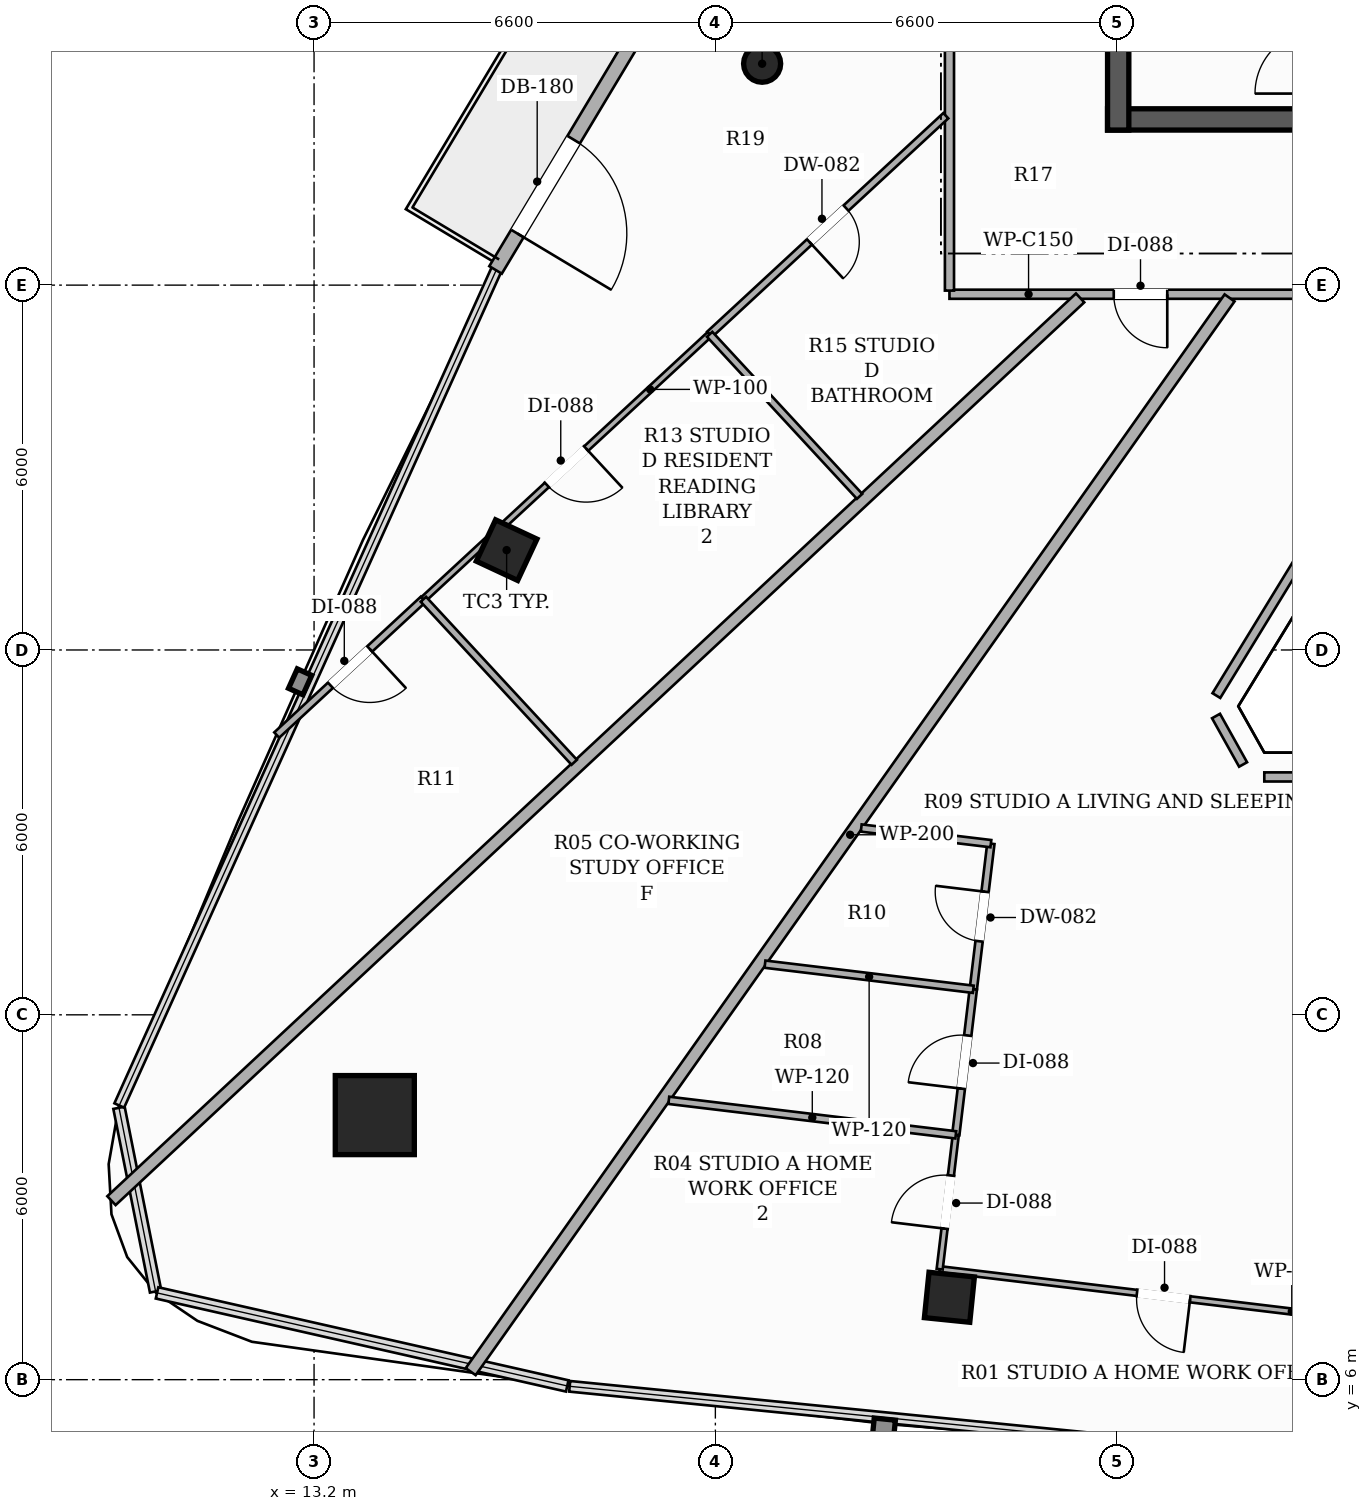
"""IFC4 building model, lengths in metres.
Left out: names, types, materials, properties, quantities, classifications, styles, units other than length and angle.
Written with IfcOpenShell. Run it as: python <this file> out.ifc"""

import sys

from ifc_helpers import new_model, si_unit, direction, frame, frame_2d, origin, origin_2d, place, context, subcontext, project, spatial, rectangle, hollow_rectangle, hollow_circle, extrude, element, fill, save


model = new_model("IFC4")
c1 = context("Model", 3, precision=1e-05, world=origin(), true_north=direction((0.0, 1.0)))
c2 = subcontext(c1, "Body", "Model", "MODEL_VIEW")
j1 = project(units=[si_unit("LENGTHUNIT", "METRE"), si_unit("PLANEANGLEUNIT", "RADIAN")], contexts=[c1])
p1 = place(None, origin())
s1 = spatial("IfcSite", under=j1, at=p1, CompositionType="ELEMENT")
p2 = place(p1, origin())
s2 = spatial("IfcBuilding", under=s1, at=p2, CompositionType="ELEMENT")
p3 = place(p2, frame((0.0, 0.0, 219.5)))
s3 = spatial("IfcBuildingStorey", under=s2, at=p3, CompositionType="ELEMENT", Elevation=219.5)
p4 = place(p3, frame((26.25, 26.725, 0.0), z_axis=(0.0, 0.0, 1.0), x_axis=(1.0, 0.0, 0.0)))
e1 = element("IfcWall", 1, at=p4, inside=s3, PredefinedType="SHEAR", context=c2, shape_type="SweptSolid", body=[
    extrude(rectangle(XDim=13.5, YDim=0.35, at=frame_2d((6.75, 0.0))), origin(), (0.0, 0.0, 1.0), 3.3),
])
p5 = place(p4, frame((4.35, 0.0, 0.0)))
e2 = element("IfcOpeningElement", 2, at=p5, cuts=e1, PredefinedType="OPENING", context=c2, shape_type="SweptSolid", body=[
    extrude(rectangle(XDim=1.05, YDim=2.15, at=frame_2d((0.525, 1.075))), frame((0.0, 0.185, 0.0), z_axis=(0.0, -1.0, 0.0), x_axis=(1.0, 0.0, 0.0)), (0.0, 0.0, 1.0), 0.37),
])
p6 = place(p4, frame((8.3, 0.0, 0.0)))
e3 = element("IfcOpeningElement", 3, at=p6, cuts=e1, PredefinedType="OPENING", context=c2, shape_type="SweptSolid", body=[
    extrude(rectangle(XDim=1.05, YDim=2.15, at=frame_2d((0.525, 1.075))), frame((0.0, 0.185, 0.0), z_axis=(0.0, -1.0, 0.0), x_axis=(1.0, 0.0, 0.0)), (0.0, 0.0, 1.0), 0.37),
])
p7 = place(p3, frame((26.425, 26.55, 0.0), z_axis=(0.0, 0.0, 1.0), x_axis=(0.0, 1.0, 0.0)))
e4 = element("IfcWall", 4, at=p7, inside=s3, PredefinedType="SHEAR", context=c2, shape_type="SweptSolid", body=[
    extrude(rectangle(XDim=7.5, YDim=0.35, at=frame_2d((3.75, 0.0))), origin(), (0.0, 0.0, 1.0), 3.3),
])
p8 = place(p3, frame((14.199, 10.351, 0.0), z_axis=(0.0, 0.0, 1.0), x_axis=(1.0, 0.0, 0.0)))
e5 = element("IfcColumn", 5, at=p8, inside=s3, PredefinedType="COLUMN", context=c2, shape_type="SweptSolid", body=[
    extrude(hollow_rectangle(XDim=1.3, YDim=1.3, WallThickness=0.04, at=origin_2d()), origin(), (0.0, 0.0, 1.0), 3.3),
])
p9 = place(p3, frame((20.569, 27.641, 0.0), z_axis=(0.0, 0.0, 1.0), x_axis=(1.0, 0.0, 0.0)))
e6 = element("IfcColumn", 6, at=p9, inside=s3, PredefinedType="COLUMN", context=c2, shape_type="SweptSolid", body=[
    extrude(hollow_circle(Radius=0.305, WallThickness=0.016, at=origin_2d()), origin(), (0.0, 0.0, 1.0), 3.3),
])
for number, where, z_axis, x_axis in (
    (7, (16.367, 19.642, 0.0), (0.0, 0.0, 1.0), (0.423, 0.906, 0.0)),
    (8, (23.649, 7.355, 0.0), (0.0, 0.0, 1.0), (-0.995, 0.101, 0.0)),
):
    element("IfcColumn", number, at=place(p3, frame(where, z_axis=z_axis, x_axis=x_axis)), inside=s3, PredefinedType="COLUMN", context=c2, shape_type="SweptSolid", body=[
        extrude(hollow_rectangle(XDim=0.75, YDim=0.75, WallThickness=0.025, at=origin_2d()), origin(), (0.0, 0.0, 1.0), 3.3),
    ])
p10 = place(p3, frame((21.458, 33.042, 0.0), z_axis=(0.0, 0.0, 1.0), x_axis=(-0.51433465168, -0.857589567381, 0.0)))
e9 = element("IfcWall", 9, at=p10, inside=s3, PredefinedType="SOLIDWALL", context=c2, shape_type="SweptSolid", body=[
    extrude(rectangle(XDim=10.252, YDim=0.24, at=frame_2d((5.126, 0.0))), origin(), (0.0, 0.0, 1.0), 2.624),
])
p11 = place(p10, frame((7.754, 0.0, 0.0)))
e10 = element("IfcOpeningElement", 10, at=p11, cuts=e9, PredefinedType="OPENING", context=c2, shape_type="SweptSolid", body=[
    extrude(rectangle(XDim=1.8, YDim=2.2, at=frame_2d((0.9, 1.1))), frame((0.0, 0.13, 0.0), z_axis=(0.0, -1.0, 0.0), x_axis=(1.0, 0.0, 0.0)), (0.0, 0.0, 1.0), 0.26),
])
p12 = place(p3, frame((32.073, 23.85, 0.0), z_axis=(0.0, 0.0, 1.0), x_axis=(-1.0, 0.0, 0.0)))
e11 = element("IfcWall", 11, at=p12, inside=s3, PredefinedType="PARTITIONING", context=c2, shape_type="SweptSolid", body=[
    extrude(rectangle(XDim=8.423, YDim=0.15, at=frame_2d((4.211, 0.0))), origin(), (0.0, 0.0, 1.0), 2.565),
])
p13 = place(p12, frame((1.601, 0.0, 0.0)))
e12 = element("IfcOpeningElement", 12, at=p13, cuts=e11, PredefinedType="OPENING", context=c2, shape_type="SweptSolid", body=[
    extrude(rectangle(XDim=0.92, YDim=2.15, at=frame_2d((0.46, 1.075))), frame((0.0, 0.085, 0.0), z_axis=(0.0, -1.0, 0.0), x_axis=(1.0, 0.0, 0.0)), (0.0, 0.0, 1.0), 0.17),
])
p14 = place(p12, frame((4.841, 0.0, 0.0)))
e13 = element("IfcOpeningElement", 13, at=p14, cuts=e11, PredefinedType="OPENING", context=c2, shape_type="SweptSolid", body=[
    extrude(rectangle(XDim=0.88, YDim=2.1, at=frame_2d((0.44, 1.05))), frame((0.0, 0.085, 0.0), z_axis=(0.0, -1.0, 0.0), x_axis=(1.0, 0.0, 0.0)), (0.0, 0.0, 1.0), 0.17),
])
p15 = place(p3, frame((23.65, 23.91, 0.0), z_axis=(0.0, 0.0, 1.0), x_axis=(0.0, 1.0, 0.0)))
e14 = element("IfcWall", 14, at=p15, inside=s3, PredefinedType="PARTITIONING", context=c2, shape_type="SweptSolid", body=[
    extrude(rectangle(XDim=12.163, YDim=0.15, at=frame_2d((6.082, 0.0))), origin(), (0.0, 0.0, 1.0), 2.492),
])
p16 = place(p15, frame((5.622, 0.0, 0.0)))
e15 = element("IfcOpeningElement", 15, at=p16, cuts=e14, PredefinedType="OPENING", context=c2, shape_type="SweptSolid", body=[
    extrude(rectangle(XDim=0.92, YDim=2.15, at=frame_2d((0.46, 1.075))), frame((0.0, 0.085, 0.0), z_axis=(0.0, -1.0, 0.0), x_axis=(1.0, 0.0, 0.0)), (0.0, 0.0, 1.0), 0.17),
])
p17 = place(p3, frame((37.172, 15.912, 0.0), z_axis=(0.0, 0.0, 1.0), x_axis=(-1.0, 0.0, 0.0)))
e16 = element("IfcWall", 16, at=p17, inside=s3, PredefinedType="PARTITIONING", context=c2, shape_type="SweptSolid", body=[
    extrude(rectangle(XDim=8.344, YDim=0.15, at=frame_2d((4.172, 0.0))), origin(), (0.0, 0.0, 1.0), 2.773),
])
p18 = place(p3, frame((28.479, 16.117, 0.0), z_axis=(0.0, 0.0, 1.0), x_axis=(-0.487503666908, 0.873120939361, 0.0)))
e17 = element("IfcWall", 17, at=p18, inside=s3, PredefinedType="PARTITIONING", context=c2, shape_type="SweptSolid", body=[
    extrude(rectangle(XDim=0.913, YDim=0.15, at=frame_2d((0.457, 0.0))), origin(), (0.0, 0.0, 1.0), 3.06),
])
p19 = place(p3, frame((28.04, 17.25, 0.0), z_axis=(0.0, 0.0, 1.0), x_axis=(0.521949656317, 0.852976292912, 0.0)))
e18 = element("IfcWall", 18, at=p19, inside=s3, PredefinedType="PARTITIONING", context=c2, shape_type="SweptSolid", body=[
    extrude(rectangle(XDim=7.667, YDim=0.15, at=frame_2d((3.833, 0.0))), origin(), (0.0, 0.0, 1.0), 2.773),
])
p20 = place(p3, frame((15.776, 6.132, 0.0), z_axis=(0.0, 0.0, 1.0), x_axis=(0.577200381612, 0.816602546816, 0.0)))
e19 = element("IfcWall", 19, at=p20, inside=s3, PredefinedType="PARTITIONING", context=c2, shape_type="SweptSolid", body=[
    extrude(rectangle(XDim=21.624, YDim=0.2, at=frame_2d((10.812, 0.0))), origin(), (0.0, 0.0, 1.0), 2.492),
])
p21 = place(p3, frame((25.799, 23.79, 0.0), z_axis=(0.0, 0.0, 1.0), x_axis=(-0.731584830333, -0.681750420629, 0.0)))
e20 = element("IfcWall", 20, at=p21, inside=s3, PredefinedType="PARTITIONING", context=c2, shape_type="SweptSolid", body=[
    extrude(rectangle(XDim=21.776, YDim=0.2, at=frame_2d((10.888, 0.0))), origin(), (0.0, 0.0, 1.0), 2.492),
])
p22 = place(p3, frame((24.042, 12.42, 0.0), z_axis=(0.0, 0.0, 1.0), x_axis=(0.119823599825, 0.992795197876, 0.0)))
e21 = element("IfcWall", 21, at=p22, inside=s3, PredefinedType="PARTITIONING", context=c2, shape_type="SweptSolid", body=[
    extrude(rectangle(XDim=2.412, YDim=0.12, at=frame_2d((1.206, 0.0))), origin(), (0.0, 0.0, 1.0), 3.06),
])
p23 = place(p22, frame((0.796, 0.0, 0.0)))
e22 = element("IfcOpeningElement", 22, at=p23, cuts=e21, PredefinedType="OPENING", context=c2, shape_type="SweptSolid", body=[
    extrude(rectangle(XDim=0.82, YDim=2.1, at=frame_2d((0.41, 1.05))), frame((0.0, 0.07, 0.0), z_axis=(0.0, -1.0, 0.0), x_axis=(1.0, 0.0, 0.0)), (0.0, 0.0, 1.0), 0.14),
])
p24 = place(p3, frame((24.331, 14.815, 0.0), z_axis=(0.0, 0.0, 1.0), x_axis=(-0.992808897326, 0.119710038805, 0.0)))
e23 = element("IfcWall", 23, at=p24, inside=s3, PredefinedType="PARTITIONING", context=c2, shape_type="SweptSolid", body=[
    extrude(rectangle(XDim=2.147, YDim=0.12, at=frame_2d((1.074, 0.0))), origin(), (0.0, 0.0, 1.0), 3.06),
])
p25 = place(p3, frame((23.754, 10.026, 0.0), z_axis=(0.0, 0.0, 1.0), x_axis=(0.119472593193, 0.992837499028, 0.0)))
e24 = element("IfcWall", 24, at=p25, inside=s3, PredefinedType="PARTITIONING", context=c2, shape_type="SweptSolid", body=[
    extrude(rectangle(XDim=2.411, YDim=0.12, at=frame_2d((1.206, 0.0))), origin(), (0.0, 0.0, 1.0), 3.06),
])
p26 = place(p25, frame((0.766, 0.0, 0.0)))
e25 = element("IfcOpeningElement", 25, at=p26, cuts=e24, PredefinedType="OPENING", context=c2, shape_type="SweptSolid", body=[
    extrude(rectangle(XDim=0.88, YDim=2.1, at=frame_2d((0.44, 1.05))), frame((0.0, 0.07, 0.0), z_axis=(0.0, -1.0, 0.0), x_axis=(1.0, 0.0, 0.0)), (0.0, 0.0, 1.0), 0.14),
])
p27 = place(p3, frame((30.853, 6.931, 0.0), z_axis=(0.0, 0.0, 1.0), x_axis=(-0.992840033501, 0.119451529409, 0.0)))
e26 = element("IfcWall", 26, at=p27, inside=s3, PredefinedType="PARTITIONING", context=c2, shape_type="SweptSolid", body=[
    extrude(rectangle(XDim=7.417, YDim=0.1, at=frame_2d((3.708, 0.0))), origin(), (0.0, 0.0, 1.0), 2.492),
])
p28 = place(p27, frame((3.269, 0.0, 0.0)))
e27 = element("IfcOpeningElement", 27, at=p28, cuts=e26, PredefinedType="OPENING", context=c2, shape_type="SweptSolid", body=[
    extrude(rectangle(XDim=0.88, YDim=2.1, at=frame_2d((0.44, 1.05))), frame((0.0, 0.06, 0.0), z_axis=(0.0, -1.0, 0.0), x_axis=(1.0, 0.0, 0.0)), (0.0, 0.0, 1.0), 0.12),
])
p29 = place(p3, frame((23.489, 7.817, 0.0), z_axis=(0.0, 0.0, 1.0), x_axis=(0.119063005136, 0.992886700892, 0.0)))
e28 = element("IfcWall", 28, at=p29, inside=s3, PredefinedType="PARTITIONING", context=c2, shape_type="SweptSolid", body=[
    extrude(rectangle(XDim=2.225, YDim=0.1, at=frame_2d((1.112, 0.0))), origin(), (0.0, 0.0, 1.0), 2.492),
])
p30 = place(p29, frame((0.672, 0.0, 0.0)))
e29 = element("IfcOpeningElement", 29, at=p30, cuts=e28, PredefinedType="OPENING", context=c2, shape_type="SweptSolid", body=[
    extrude(rectangle(XDim=0.88, YDim=2.1, at=frame_2d((0.44, 1.05))), frame((0.0, 0.06, 0.0), z_axis=(0.0, -1.0, 0.0), x_axis=(1.0, 0.0, 0.0)), (0.0, 0.0, 1.0), 0.12),
])
p31 = place(p3, frame((24.042, 12.42, 0.0), z_axis=(0.0, 0.0, 1.0), x_axis=(-0.992809391247, 0.119705942421, 0.0)))
e30 = element("IfcWall", 30, at=p31, inside=s3, PredefinedType="PARTITIONING", context=c2, shape_type="SweptSolid", body=[
    extrude(rectangle(XDim=3.451, YDim=0.12, at=frame_2d((1.726, 0.0))), origin(), (0.0, 0.0, 1.0), 2.773),
])
p32 = place(p3, frame((23.754, 10.026, 0.0), z_axis=(0.0, 0.0, 1.0), x_axis=(-0.992834006213, 0.1195016155, 0.0)))
e31 = element("IfcWall", 31, at=p32, inside=s3, PredefinedType="PARTITIONING", context=c2, shape_type="SweptSolid", body=[
    extrude(rectangle(XDim=4.754, YDim=0.12, at=frame_2d((2.377, 0.0))), origin(), (0.0, 0.0, 1.0), 2.773),
])
p33 = place(p3, frame((23.59, 26.786, 0.0), z_axis=(0.0, 0.0, 1.0), x_axis=(-0.733888422473, -0.679270037143, 0.0)))
e32 = element("IfcWall", 32, at=p33, inside=s3, PredefinedType="PARTITIONING", context=c2, shape_type="SweptSolid", body=[
    extrude(rectangle(XDim=5.292, YDim=0.12, at=frame_2d((2.646, 0.0))), origin(), (0.0, 0.0, 1.0), 3.06),
])
p34 = place(p33, frame((2.236, 0.0, 0.0)))
e33 = element("IfcOpeningElement", 33, at=p34, cuts=e32, PredefinedType="OPENING", context=c2, shape_type="SweptSolid", body=[
    extrude(rectangle(XDim=0.82, YDim=2.1, at=frame_2d((0.41, 1.05))), frame((0.0, 0.07, 0.0), z_axis=(0.0, -1.0, 0.0), x_axis=(1.0, 0.0, 0.0)), (0.0, 0.0, 1.0), 0.14),
])
p35 = place(p3, frame((14.998, 18.834, 0.0), z_axis=(0.0, 0.0, 1.0), x_axis=(-0.733840210512, -0.679322121998, 0.0)))
e34 = element("IfcWall", 34, at=p35, inside=s3, PredefinedType="PARTITIONING", context=c2, shape_type="SweptSolid", body=[
    extrude(rectangle(XDim=3.287, YDim=0.12, at=frame_2d((1.644, 0.0))), origin(), (0.0, 0.0, 1.0), 3.06),
])
p36 = place(p35, frame((1.203, 0.0, 0.0)))
e35 = element("IfcOpeningElement", 35, at=p36, cuts=e34, PredefinedType="OPENING", context=c2, shape_type="SweptSolid", body=[
    extrude(rectangle(XDim=0.88, YDim=2.1, at=frame_2d((0.44, 1.05))), frame((0.0, 0.07, 0.0), z_axis=(0.0, -1.0, 0.0), x_axis=(1.0, 0.0, 0.0)), (0.0, 0.0, 1.0), 0.14),
])
p37 = place(p3, frame((19.706, 23.191, 0.0), z_axis=(0.0, 0.0, 1.0), x_axis=(-0.733941951163, -0.679212199775, 0.0)))
e36 = element("IfcWall", 36, at=p37, inside=s3, PredefinedType="PARTITIONING", context=c2, shape_type="SweptSolid", body=[
    extrude(rectangle(XDim=6.415, YDim=0.1, at=frame_2d((3.208, 0.0))), origin(), (0.0, 0.0, 1.0), 2.492),
])
p38 = place(p37, frame((2.767, 0.0, 0.0)))
e37 = element("IfcOpeningElement", 37, at=p38, cuts=e36, PredefinedType="OPENING", context=c2, shape_type="SweptSolid", body=[
    extrude(rectangle(XDim=0.88, YDim=2.1, at=frame_2d((0.44, 1.05))), frame((0.0, 0.06, 0.0), z_axis=(0.0, -1.0, 0.0), x_axis=(1.0, 0.0, 0.0)), (0.0, 0.0, 1.0), 0.12),
])
p39 = place(p3, frame((22.172, 20.526, 0.0), z_axis=(0.0, 0.0, 1.0), x_axis=(-0.67917603964, 0.733975413198, 0.0)))
e38 = element("IfcWall", 38, at=p39, inside=s3, PredefinedType="PARTITIONING", context=c2, shape_type="SweptSolid", body=[
    extrude(rectangle(XDim=3.631, YDim=0.12, at=frame_2d((1.815, 0.0))), origin(), (0.0, 0.0, 1.0), 2.565),
])
p40 = place(p3, frame((14.998, 18.834, 0.0), z_axis=(0.0, 0.0, 1.0), x_axis=(0.67920675179, -0.733946992856, 0.0)))
e39 = element("IfcWall", 39, at=p40, inside=s3, PredefinedType="PARTITIONING", context=c2, shape_type="SweptSolid", body=[
    extrude(rectangle(XDim=3.653, YDim=0.12, at=frame_2d((1.826, 0.0))), origin(), (0.0, 0.0, 1.0), 2.492),
])
p41 = place(p11, origin())
e40 = element("IfcDoor", 40, at=p41, inside=s3, OperationType="SINGLE_SWING_RIGHT", PredefinedType="DOOR", context=c2, shape_type="SweptSolid", body=[
    extrude(rectangle(XDim=1.8, YDim=2.2, at=frame_2d((0.9, 1.1))), frame((0.0, 0.025, 0.0), z_axis=(0.0, -1.0, 0.0), x_axis=(1.0, 0.0, 0.0)), (0.0, 0.0, 1.0), 0.05),
])
fill(e10, e40)
p42 = place(p23, origin())
e41 = element("IfcDoor", 41, at=p42, inside=s3, OperationType="SINGLE_SWING_RIGHT", PredefinedType="DOOR", context=c2, shape_type="SweptSolid", body=[
    extrude(rectangle(XDim=0.82, YDim=2.1, at=frame_2d((0.41, 1.05))), frame((0.0, 0.025, 0.0), z_axis=(0.0, -1.0, 0.0), x_axis=(1.0, 0.0, 0.0)), (0.0, 0.0, 1.0), 0.05),
])
fill(e22, e41)
p43 = place(p26, origin())
e42 = element("IfcDoor", 42, at=p43, inside=s3, OperationType="SINGLE_SWING_LEFT", PredefinedType="DOOR", context=c2, shape_type="SweptSolid", body=[
    extrude(rectangle(XDim=0.88, YDim=2.1, at=frame_2d((0.44, 1.05))), frame((0.0, 0.025, 0.0), z_axis=(0.0, -1.0, 0.0), x_axis=(1.0, 0.0, 0.0)), (0.0, 0.0, 1.0), 0.05),
])
fill(e25, e42)
p44 = place(p28, origin())
e43 = element("IfcDoor", 43, at=p44, inside=s3, OperationType="SINGLE_SWING_LEFT", PredefinedType="DOOR", context=c2, shape_type="SweptSolid", body=[
    extrude(rectangle(XDim=0.88, YDim=2.1, at=frame_2d((0.44, 1.05))), frame((0.0, 0.025, 0.0), z_axis=(0.0, -1.0, 0.0), x_axis=(1.0, 0.0, 0.0)), (0.0, 0.0, 1.0), 0.05),
])
fill(e27, e43)
p45 = place(p30, origin())
e44 = element("IfcDoor", 44, at=p45, inside=s3, OperationType="SINGLE_SWING_LEFT", PredefinedType="DOOR", context=c2, shape_type="SweptSolid", body=[
    extrude(rectangle(XDim=0.88, YDim=2.1, at=frame_2d((0.44, 1.05))), frame((0.0, 0.025, 0.0), z_axis=(0.0, -1.0, 0.0), x_axis=(1.0, 0.0, 0.0)), (0.0, 0.0, 1.0), 0.05),
])
fill(e29, e44)
p46 = place(p34, origin())
e45 = element("IfcDoor", 45, at=p46, inside=s3, OperationType="SINGLE_SWING_RIGHT", PredefinedType="DOOR", context=c2, shape_type="SweptSolid", body=[
    extrude(rectangle(XDim=0.82, YDim=2.1, at=frame_2d((0.41, 1.05))), frame((0.0, 0.025, 0.0), z_axis=(0.0, -1.0, 0.0), x_axis=(1.0, 0.0, 0.0)), (0.0, 0.0, 1.0), 0.05),
])
fill(e33, e45)
p47 = place(p36, origin())
e46 = element("IfcDoor", 46, at=p47, inside=s3, OperationType="SINGLE_SWING_LEFT", PredefinedType="DOOR", context=c2, shape_type="SweptSolid", body=[
    extrude(rectangle(XDim=0.88, YDim=2.1, at=frame_2d((0.44, 1.05))), frame((0.0, 0.025, 0.0), z_axis=(0.0, -1.0, 0.0), x_axis=(1.0, 0.0, 0.0)), (0.0, 0.0, 1.0), 0.05),
])
fill(e35, e46)
p48 = place(p38, origin())
e47 = element("IfcDoor", 47, at=p48, inside=s3, OperationType="SINGLE_SWING_LEFT", PredefinedType="DOOR", context=c2, shape_type="SweptSolid", body=[
    extrude(rectangle(XDim=0.88, YDim=2.1, at=frame_2d((0.44, 1.05))), frame((0.0, 0.025, 0.0), z_axis=(0.0, -1.0, 0.0), x_axis=(1.0, 0.0, 0.0)), (0.0, 0.0, 1.0), 0.05),
])
fill(e37, e47)
p49 = place(p14, origin())
e48 = element("IfcDoor", 48, at=p49, inside=s3, OperationType="SINGLE_SWING_LEFT", PredefinedType="DOOR", context=c2, shape_type="SweptSolid", body=[
    extrude(rectangle(XDim=0.88, YDim=2.1, at=frame_2d((0.44, 1.05))), frame((0.0, 0.025, 0.0), z_axis=(0.0, -1.0, 0.0), x_axis=(1.0, 0.0, 0.0)), (0.0, 0.0, 1.0), 0.05),
])
fill(e13, e48)
save(model, sys.argv[1])
